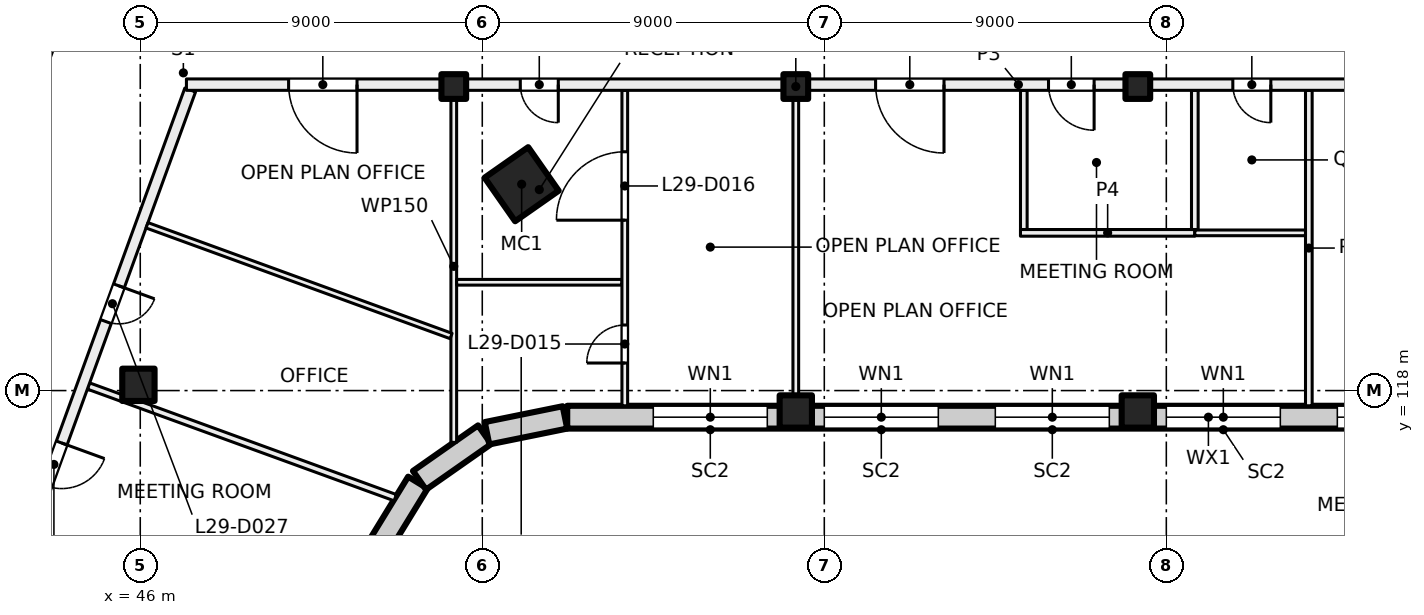
"""IFC4 building model, lengths in metres.
Left out: names, types, materials, properties, quantities, classifications, styles, units other than length and angle.
Written with IfcOpenShell. Run it as: python <this file> out.ifc"""

import sys

from ifc_helpers import new_model, si_unit, direction, frame, frame_2d, origin, origin_2d, place, context, subcontext, project, spatial, rectangle, hollow_rectangle, extrude, element, fill, save


model = new_model("IFC4")
c1 = context("Model", 3, precision=1e-05, world=origin(), true_north=direction((0.0, 1.0)))
c2 = subcontext(c1, "Body", "Model", "MODEL_VIEW")
j1 = project(units=[si_unit("LENGTHUNIT", "METRE"), si_unit("PLANEANGLEUNIT", "RADIAN")], contexts=[c1])
p1 = place(None, origin())
s1 = spatial("IfcSite", under=j1, at=p1, CompositionType="ELEMENT")
p2 = place(p1, origin())
s2 = spatial("IfcBuilding", under=s1, at=p2, CompositionType="ELEMENT")
p3 = place(p2, frame((0.0, 0.0, 125.0)))
s3 = spatial("IfcBuildingStorey", under=s2, at=p3, CompositionType="ELEMENT", Elevation=125.0)
p4 = place(p3, frame((56.036, 123.43, 0.0), z_axis=(0.0, 0.0, 1.0), x_axis=(0.573576436351, -0.819152044289, 0.0)))
e1 = element("IfcColumn", 1, at=p4, inside=s3, PredefinedType="COLUMN", context=c2, shape_type="SweptSolid", body=[
    extrude(hollow_rectangle(XDim=1.4, YDim=1.4, WallThickness=0.04, at=origin_2d()), origin(), (0.0, 0.0, 1.0), 4.0),
])
for number, where, z_axis, x_axis in (
    (2, (54.25, 126.0, 0.0), (0.0, 0.0, 1.0), (1.0, 0.0, 0.0)),
    (3, (63.25, 126.0, 0.0), (0.0, 0.0, 1.0), (1.0, 0.0, 0.0)),
    (4, (72.25, 126.0, 0.0), (0.0, 0.0, 1.0), (1.0, 0.0, 0.0)),
):
    element("IfcColumn", number, at=place(p3, frame(where, z_axis=z_axis, x_axis=x_axis)), inside=s3, PredefinedType="COLUMN", context=c2, shape_type="SweptSolid", body=[
        extrude(rectangle(XDim=0.65, YDim=0.65, at=origin_2d()), origin(), (0.0, 0.0, 1.0), 4.0),
    ])
for number, where, z_axis, x_axis in (
    (5, (45.952, 118.152, 0.0), (0.0, 0.0, 1.0), (1.0, 0.0, 0.0)),
    (6, (63.25, 117.45, 0.0), (0.0, 0.0, 1.0), (1.0, 0.0, 0.0)),
    (7, (72.25, 117.45, 0.0), (0.0, 0.0, 1.0), (1.0, 0.0, 0.0)),
):
    element("IfcColumn", number, at=place(p3, frame(where, z_axis=z_axis, x_axis=x_axis)), inside=s3, PredefinedType="COLUMN", context=c2, shape_type="SweptSolid", body=[
        extrude(rectangle(XDim=0.85, YDim=0.85, at=origin_2d()), origin(), (0.0, 0.0, 1.0), 4.0),
    ])
p5 = place(p3, frame((53.305, 115.578, 0.0), z_axis=(0.0, 0.0, 1.0), x_axis=(-0.522402266438, -0.852699168535, 0.0)))
e8 = element("IfcWall", 8, at=p5, inside=s3, PredefinedType="SOLIDWALL", context=c2, shape_type="SweptSolid", body=[
    extrude(rectangle(XDim=2.042, YDim=0.6, at=frame_2d((1.021, 0.0))), origin(), (0.0, 0.0, 1.0), 3.625),
])
for number, where, z_axis, x_axis in (
    (9, (55.062, 116.839, 0.0), (0.0, 0.0, 1.0), (-0.819, -0.574, 0.0)),
    (10, (57.175, 117.294, 0.0), (0.0, 0.0, 1.0), (-0.98, -0.199, 0.0)),
):
    element("IfcWall", number, at=place(p3, frame(where, z_axis=z_axis, x_axis=x_axis)), inside=s3, PredefinedType="SOLIDWALL", context=c2, shape_type="SweptSolid", body=[
        extrude(rectangle(XDim=2.092, YDim=0.6, at=frame_2d((1.046, 0.0))), origin(), (0.0, 0.0, 1.0), 3.625),
    ])
p6 = place(p3, frame((90.98, 117.3, 0.0), z_axis=(0.0, 0.0, 1.0), x_axis=(-1.0, 0.0, 0.0)))
e11 = element("IfcWall", 11, at=p6, inside=s3, PredefinedType="SOLIDWALL", context=c2, shape_type="SweptSolid", body=[
    extrude(rectangle(XDim=33.745, YDim=0.6, at=frame_2d((16.873, 0.0))), origin(), (0.0, 0.0, 1.0), 3.625),
])
p7 = place(p6, frame((1.48, 0.0, 0.9)))
e12 = element("IfcOpeningElement", 12, at=p7, cuts=e11, PredefinedType="OPENING", context=c2, shape_type="SweptSolid", body=[
    extrude(rectangle(XDim=3.0, YDim=2.4, at=frame_2d((1.5, 1.2))), frame((0.0, 0.31, 0.0), z_axis=(0.0, -1.0, 0.0), x_axis=(1.0, 0.0, 0.0)), (0.0, 0.0, 1.0), 0.62),
])
p8 = place(p6, frame((5.98, 0.0, 0.9)))
e13 = element("IfcOpeningElement", 13, at=p8, cuts=e11, PredefinedType="OPENING", context=c2, shape_type="SweptSolid", body=[
    extrude(rectangle(XDim=3.0, YDim=2.4, at=frame_2d((1.5, 1.2))), frame((0.0, 0.31, 0.0), z_axis=(0.0, -1.0, 0.0), x_axis=(1.0, 0.0, 0.0)), (0.0, 0.0, 1.0), 0.62),
])
p9 = place(p6, frame((10.48, 0.0, 0.9)))
e14 = element("IfcOpeningElement", 14, at=p9, cuts=e11, PredefinedType="OPENING", context=c2, shape_type="SweptSolid", body=[
    extrude(rectangle(XDim=3.0, YDim=2.4, at=frame_2d((1.5, 1.2))), frame((0.0, 0.31, 0.0), z_axis=(0.0, -1.0, 0.0), x_axis=(1.0, 0.0, 0.0)), (0.0, 0.0, 1.0), 0.62),
])
p10 = place(p6, frame((14.98, 0.0, 0.9)))
e15 = element("IfcOpeningElement", 15, at=p10, cuts=e11, PredefinedType="OPENING", context=c2, shape_type="SweptSolid", body=[
    extrude(rectangle(XDim=3.0, YDim=2.4, at=frame_2d((1.5, 1.2))), frame((0.0, 0.31, 0.0), z_axis=(0.0, -1.0, 0.0), x_axis=(1.0, 0.0, 0.0)), (0.0, 0.0, 1.0), 0.62),
])
p11 = place(p6, frame((19.48, 0.0, 0.9)))
e16 = element("IfcOpeningElement", 16, at=p11, cuts=e11, PredefinedType="OPENING", context=c2, shape_type="SweptSolid", body=[
    extrude(rectangle(XDim=3.0, YDim=2.4, at=frame_2d((1.5, 1.2))), frame((0.0, 0.31, 0.0), z_axis=(0.0, -1.0, 0.0), x_axis=(1.0, 0.0, 0.0)), (0.0, 0.0, 1.0), 0.62),
])
p12 = place(p6, frame((23.98, 0.0, 0.9)))
e17 = element("IfcOpeningElement", 17, at=p12, cuts=e11, PredefinedType="OPENING", context=c2, shape_type="SweptSolid", body=[
    extrude(rectangle(XDim=3.0, YDim=2.4, at=frame_2d((1.5, 1.2))), frame((0.0, 0.31, 0.0), z_axis=(0.0, -1.0, 0.0), x_axis=(1.0, 0.0, 0.0)), (0.0, 0.0, 1.0), 0.62),
])
p13 = place(p6, frame((28.48, 0.0, 0.9)))
e18 = element("IfcOpeningElement", 18, at=p13, cuts=e11, PredefinedType="OPENING", context=c2, shape_type="SweptSolid", body=[
    extrude(rectangle(XDim=3.0, YDim=2.4, at=frame_2d((1.5, 1.2))), frame((0.0, 0.31, 0.0), z_axis=(0.0, -1.0, 0.0), x_axis=(1.0, 0.0, 0.0)), (0.0, 0.0, 1.0), 0.62),
])
p14 = place(p3, frame((32.881, 97.657, 0.0), z_axis=(0.0, 0.0, 1.0), x_axis=(0.342017360004, 0.939693633828, 0.0)))
e19 = element("IfcWall", 19, at=p14, inside=s3, PredefinedType="PARTITIONING", context=c2, shape_type="SweptSolid", body=[
    extrude(rectangle(XDim=34.516, YDim=0.3, at=frame_2d((17.258, 0.0))), origin(), (0.0, 0.0, 1.0), 3.625),
])
p15 = place(p14, frame((4.275, 0.0, 0.0)))
e20 = element("IfcOpeningElement", 20, at=p15, cuts=e19, PredefinedType="OPENING", context=c2, shape_type="SweptSolid", body=[
    extrude(rectangle(XDim=1.2, YDim=2.1, at=frame_2d((0.6, 1.05))), frame((0.0, 0.16, 0.0), z_axis=(0.0, -1.0, 0.0), x_axis=(1.0, 0.0, 0.0)), (0.0, 0.0, 1.0), 0.32),
])
p16 = place(p14, frame((10.75, 0.0, 0.0)))
e21 = element("IfcOpeningElement", 21, at=p16, cuts=e19, PredefinedType="OPENING", context=c2, shape_type="SweptSolid", body=[
    extrude(rectangle(XDim=1.0, YDim=2.1, at=frame_2d((0.5, 1.05))), frame((0.0, 0.16, 0.0), z_axis=(0.0, -1.0, 0.0), x_axis=(1.0, 0.0, 0.0)), (0.0, 0.0, 1.0), 0.32),
])
p17 = place(p14, frame((15.25, 0.0, 0.0)))
e22 = element("IfcOpeningElement", 22, at=p17, cuts=e19, PredefinedType="OPENING", context=c2, shape_type="SweptSolid", body=[
    extrude(rectangle(XDim=1.0, YDim=2.1, at=frame_2d((0.5, 1.05))), frame((0.0, 0.16, 0.0), z_axis=(0.0, -1.0, 0.0), x_axis=(1.0, 0.0, 0.0)), (0.0, 0.0, 1.0), 0.32),
])
p18 = place(p14, frame((20.4, 0.0, 0.0)))
e23 = element("IfcOpeningElement", 23, at=p18, cuts=e19, PredefinedType="OPENING", context=c2, shape_type="SweptSolid", body=[
    extrude(rectangle(XDim=1.2, YDim=2.1, at=frame_2d((0.6, 1.05))), frame((0.0, 0.16, 0.0), z_axis=(0.0, -1.0, 0.0), x_axis=(1.0, 0.0, 0.0)), (0.0, 0.0, 1.0), 0.32),
])
p19 = place(p14, frame((25.0, 0.0, 0.0)))
e24 = element("IfcOpeningElement", 24, at=p19, cuts=e19, PredefinedType="OPENING", context=c2, shape_type="SweptSolid", body=[
    extrude(rectangle(XDim=1.0, YDim=2.1, at=frame_2d((0.5, 1.05))), frame((0.0, 0.16, 0.0), z_axis=(0.0, -1.0, 0.0), x_axis=(1.0, 0.0, 0.0)), (0.0, 0.0, 1.0), 0.32),
])
p20 = place(p3, frame((44.639, 118.12, 0.0), z_axis=(0.0, 0.0, 1.0), x_axis=(0.939669707102, -0.342083091593, 0.0)))
e25 = element("IfcWall", 25, at=p20, inside=s3, PredefinedType="PARTITIONING", context=c2, shape_type="SweptSolid", body=[
    extrude(rectangle(XDim=8.589, YDim=0.175, at=frame_2d((4.295, 0.0))), origin(), (0.0, 0.0, 1.0), 3.625),
])
p21 = place(p3, frame((47.314, 125.909, 0.0), z_axis=(0.0, 0.0, 1.0), x_axis=(-0.342010770371, -0.939696032209, 0.0)))
e26 = element("IfcWall", 26, at=p21, inside=s3, PredefinedType="PARTITIONING", context=c2, shape_type="SweptSolid", body=[
    extrude(rectangle(XDim=31.485, YDim=0.3, at=frame_2d((15.742, 0.0))), origin(), (0.0, 0.0, 1.0), 3.625),
])
p22 = place(p21, frame((22.21, 0.0, 0.0)))
e27 = element("IfcOpeningElement", 27, at=p22, cuts=e26, PredefinedType="OPENING", context=c2, shape_type="SweptSolid", body=[
    extrude(rectangle(XDim=1.8, YDim=2.1, at=frame_2d((0.9, 1.05))), frame((0.0, 0.16, 0.0), z_axis=(0.0, -1.0, 0.0), x_axis=(1.0, 0.0, 0.0)), (0.0, 0.0, 1.0), 0.32),
])
p23 = place(p21, frame((9.885, 0.0, 0.0)))
e28 = element("IfcOpeningElement", 28, at=p23, cuts=e26, PredefinedType="OPENING", context=c2, shape_type="SweptSolid", body=[
    extrude(rectangle(XDim=1.2, YDim=2.1, at=frame_2d((0.6, 1.05))), frame((0.0, 0.16, 0.0), z_axis=(0.0, -1.0, 0.0), x_axis=(1.0, 0.0, 0.0)), (0.0, 0.0, 1.0), 0.32),
])
p24 = place(p21, frame((5.484, 0.0, 0.0)))
e29 = element("IfcOpeningElement", 29, at=p24, cuts=e26, PredefinedType="OPENING", context=c2, shape_type="SweptSolid", body=[
    extrude(rectangle(XDim=1.0, YDim=2.1, at=frame_2d((0.5, 1.05))), frame((0.0, 0.16, 0.0), z_axis=(0.0, -1.0, 0.0), x_axis=(1.0, 0.0, 0.0)), (0.0, 0.0, 1.0), 0.32),
])
p25 = place(p3, frame((54.25, 116.637, 0.0), z_axis=(0.0, 0.0, 1.0), x_axis=(0.0, 1.0, 0.0)))
e30 = element("IfcWall", 30, at=p25, inside=s3, PredefinedType="PARTITIONING", context=c2, shape_type="SweptSolid", body=[
    extrude(rectangle(XDim=9.263, YDim=0.15, at=frame_2d((4.631, 0.0))), origin(), (0.0, 0.0, 1.0), 3.625),
])
p26 = place(p3, frame((54.18, 119.436, 0.0), z_axis=(0.0, 0.0, 1.0), x_axis=(-0.939669476286, 0.342083725624, 0.0)))
e31 = element("IfcWall", 31, at=p26, inside=s3, PredefinedType="PARTITIONING", context=c2, shape_type="SweptSolid", body=[
    extrude(rectangle(XDim=8.516, YDim=0.15, at=frame_2d((4.258, 0.0))), origin(), (0.0, 0.0, 1.0), 3.625),
])
p27 = place(p3, frame((54.325, 120.85, 0.0), z_axis=(0.0, 0.0, 1.0), x_axis=(1.0, 0.0, 0.0)))
e32 = element("IfcWall", 32, at=p27, inside=s3, PredefinedType="PARTITIONING", context=c2, shape_type="SweptSolid", body=[
    extrude(rectangle(XDim=4.35, YDim=0.15, at=frame_2d((2.175, 0.0))), origin(), (0.0, 0.0, 1.0), 3.625),
])
p28 = place(p3, frame((58.75, 117.6, 0.0), z_axis=(0.0, 0.0, 1.0), x_axis=(0.0, 1.0, 0.0)))
e33 = element("IfcWall", 33, at=p28, inside=s3, PredefinedType="PARTITIONING", context=c2, shape_type="SweptSolid", body=[
    extrude(rectangle(XDim=8.3, YDim=0.15, at=frame_2d((4.15, 0.0))), origin(), (0.0, 0.0, 1.0), 3.625),
])
p29 = place(p28, frame((1.125, 0.0, 0.0)))
e34 = element("IfcOpeningElement", 34, at=p29, cuts=e33, PredefinedType="OPENING", context=c2, shape_type="SweptSolid", body=[
    extrude(rectangle(XDim=1.0, YDim=2.1, at=frame_2d((0.5, 1.05))), frame((0.0, 0.085, 0.0), z_axis=(0.0, -1.0, 0.0), x_axis=(1.0, 0.0, 0.0)), (0.0, 0.0, 1.0), 0.17),
])
p30 = place(p28, frame((4.884, 0.0, 0.0)))
e35 = element("IfcOpeningElement", 35, at=p30, cuts=e33, PredefinedType="OPENING", context=c2, shape_type="SweptSolid", body=[
    extrude(rectangle(XDim=1.8, YDim=2.1, at=frame_2d((0.9, 1.05))), frame((0.0, 0.085, 0.0), z_axis=(0.0, -1.0, 0.0), x_axis=(1.0, 0.0, 0.0)), (0.0, 0.0, 1.0), 0.17),
])
p31 = place(p3, frame((63.25, 117.6, 0.0), z_axis=(0.0, 0.0, 1.0), x_axis=(0.0, 1.0, 0.0)))
e36 = element("IfcWall", 36, at=p31, inside=s3, PredefinedType="PARTITIONING", context=c2, shape_type="SweptSolid", body=[
    extrude(rectangle(XDim=8.3, YDim=0.15, at=frame_2d((4.15, 0.0))), origin(), (0.0, 0.0, 1.0), 3.625),
])
p32 = place(p3, frame((69.25, 122.238, 0.0), z_axis=(0.0, 0.0, 1.0), x_axis=(0.0, 1.0, 0.0)))
e37 = element("IfcWall", 37, at=p32, inside=s3, PredefinedType="PARTITIONING", context=c2, shape_type="SweptSolid", body=[
    extrude(rectangle(XDim=3.662, YDim=0.175, at=frame_2d((1.831, 0.0))), origin(), (0.0, 0.0, 1.0), 3.625),
])
p33 = place(p3, frame((73.75, 122.15, 0.0), z_axis=(0.0, 0.0, 1.0), x_axis=(-1.0, 0.0, 0.0)))
e38 = element("IfcWall", 38, at=p33, inside=s3, PredefinedType="PARTITIONING", context=c2, shape_type="SweptSolid", body=[
    extrude(rectangle(XDim=4.588, YDim=0.175, at=frame_2d((2.294, 0.0))), origin(), (0.0, 0.0, 1.0), 3.625),
])
p34 = place(p3, frame((73.75, 125.9, 0.0), z_axis=(0.0, 0.0, 1.0), x_axis=(0.0, -1.0, 0.0)))
e39 = element("IfcWall", 39, at=p34, inside=s3, PredefinedType="PARTITIONING", context=c2, shape_type="SweptSolid", body=[
    extrude(rectangle(XDim=3.662, YDim=0.175, at=frame_2d((1.831, 0.0))), origin(), (0.0, 0.0, 1.0), 3.625),
])
p35 = place(p3, frame((76.75, 117.6, 0.0), z_axis=(0.0, 0.0, 1.0), x_axis=(0.0, 1.0, 0.0)))
e40 = element("IfcWall", 40, at=p35, inside=s3, PredefinedType="PARTITIONING", context=c2, shape_type="SweptSolid", body=[
    extrude(rectangle(XDim=8.3, YDim=0.175, at=frame_2d((4.15, 0.0))), origin(), (0.0, 0.0, 1.0), 3.625),
])
p36 = place(p3, frame((76.662, 122.15, 0.0), z_axis=(0.0, 0.0, 1.0), x_axis=(-1.0, 0.0, 0.0)))
e41 = element("IfcWall", 41, at=p36, inside=s3, PredefinedType="PARTITIONING", context=c2, shape_type="SweptSolid", body=[
    extrude(rectangle(XDim=2.912, YDim=0.15, at=frame_2d((1.456, 0.0))), origin(), (0.0, 0.0, 1.0), 3.625),
])
p37 = place(p3, frame((91.0, 126.05, 0.0), z_axis=(0.0, 0.0, 1.0), x_axis=(-1.0, 0.0, 0.0)))
e42 = element("IfcWall", 42, at=p37, inside=s3, PredefinedType="PARTITIONING", context=c2, shape_type="SweptSolid", body=[
    extrude(rectangle(XDim=43.785, YDim=0.3, at=frame_2d((21.893, 0.0))), origin(), (0.0, 0.0, 1.0), 3.625),
])
p38 = place(p37, frame((2.025, 0.0, 0.0)))
e43 = element("IfcOpeningElement", 43, at=p38, cuts=e42, PredefinedType="OPENING", context=c2, shape_type="SweptSolid", body=[
    extrude(rectangle(XDim=1.2, YDim=2.1, at=frame_2d((0.6, 1.05))), frame((0.0, 0.16, 0.0), z_axis=(0.0, -1.0, 0.0), x_axis=(1.0, 0.0, 0.0)), (0.0, 0.0, 1.0), 0.32),
])
p39 = place(p37, frame((6.9, 0.0, 0.0)))
e44 = element("IfcOpeningElement", 44, at=p39, cuts=e42, PredefinedType="OPENING", context=c2, shape_type="SweptSolid", body=[
    extrude(rectangle(XDim=1.2, YDim=2.1, at=frame_2d((0.6, 1.05))), frame((0.0, 0.16, 0.0), z_axis=(0.0, -1.0, 0.0), x_axis=(1.0, 0.0, 0.0)), (0.0, 0.0, 1.0), 0.32),
])
p40 = place(p37, frame((11.4, 0.0, 0.0)))
e45 = element("IfcOpeningElement", 45, at=p40, cuts=e42, PredefinedType="OPENING", context=c2, shape_type="SweptSolid", body=[
    extrude(rectangle(XDim=1.2, YDim=2.1, at=frame_2d((0.6, 1.05))), frame((0.0, 0.16, 0.0), z_axis=(0.0, -1.0, 0.0), x_axis=(1.0, 0.0, 0.0)), (0.0, 0.0, 1.0), 0.32),
])
p41 = place(p37, frame((15.25, 0.0, 0.0)))
e46 = element("IfcOpeningElement", 46, at=p41, cuts=e42, PredefinedType="OPENING", context=c2, shape_type="SweptSolid", body=[
    extrude(rectangle(XDim=1.0, YDim=2.1, at=frame_2d((0.5, 1.05))), frame((0.0, 0.16, 0.0), z_axis=(0.0, -1.0, 0.0), x_axis=(1.0, 0.0, 0.0)), (0.0, 0.0, 1.0), 0.32),
])
p42 = place(p37, frame((19.9, 0.0, 0.0)))
e47 = element("IfcOpeningElement", 47, at=p42, cuts=e42, PredefinedType="OPENING", context=c2, shape_type="SweptSolid", body=[
    extrude(rectangle(XDim=1.2, YDim=2.1, at=frame_2d((0.6, 1.05))), frame((0.0, 0.16, 0.0), z_axis=(0.0, -1.0, 0.0), x_axis=(1.0, 0.0, 0.0)), (0.0, 0.0, 1.0), 0.32),
])
p43 = place(p37, frame((23.85, 0.0, 0.0)))
e48 = element("IfcOpeningElement", 48, at=p43, cuts=e42, PredefinedType="OPENING", context=c2, shape_type="SweptSolid", body=[
    extrude(rectangle(XDim=1.8, YDim=2.1, at=frame_2d((0.9, 1.05))), frame((0.0, 0.16, 0.0), z_axis=(0.0, -1.0, 0.0), x_axis=(1.0, 0.0, 0.0)), (0.0, 0.0, 1.0), 0.32),
])
p44 = place(p37, frame((34.0, 0.0, 0.0)))
e49 = element("IfcOpeningElement", 49, at=p44, cuts=e42, PredefinedType="OPENING", context=c2, shape_type="SweptSolid", body=[
    extrude(rectangle(XDim=1.0, YDim=2.1, at=frame_2d((0.5, 1.05))), frame((0.0, 0.16, 0.0), z_axis=(0.0, -1.0, 0.0), x_axis=(1.0, 0.0, 0.0)), (0.0, 0.0, 1.0), 0.32),
])
p45 = place(p37, frame((39.296, 0.0, 0.0)))
e50 = element("IfcOpeningElement", 50, at=p45, cuts=e42, PredefinedType="OPENING", context=c2, shape_type="SweptSolid", body=[
    extrude(rectangle(XDim=1.8, YDim=2.1, at=frame_2d((0.9, 1.05))), frame((0.0, 0.16, 0.0), z_axis=(0.0, -1.0, 0.0), x_axis=(1.0, 0.0, 0.0)), (0.0, 0.0, 1.0), 0.32),
])
p46 = place(p9, origin())
e51 = element("IfcWindow", 51, at=p46, inside=s3, PartitioningType="SINGLE_PANEL", PredefinedType="WINDOW", context=c2, shape_type="SweptSolid", body=[
    extrude(rectangle(XDim=3.0, YDim=2.4, at=frame_2d((1.5, 1.2))), frame((0.0, 0.03, 0.0), z_axis=(0.0, -1.0, 0.0), x_axis=(1.0, 0.0, 0.0)), (0.0, 0.0, 1.0), 0.06),
])
fill(e14, e51)
p47 = place(p10, origin())
e52 = element("IfcWindow", 52, at=p47, inside=s3, PartitioningType="SINGLE_PANEL", PredefinedType="WINDOW", context=c2, shape_type="SweptSolid", body=[
    extrude(rectangle(XDim=3.0, YDim=2.4, at=frame_2d((1.5, 1.2))), frame((0.0, 0.03, 0.0), z_axis=(0.0, -1.0, 0.0), x_axis=(1.0, 0.0, 0.0)), (0.0, 0.0, 1.0), 0.06),
])
fill(e15, e52)
p48 = place(p11, origin())
e53 = element("IfcWindow", 53, at=p48, inside=s3, PartitioningType="SINGLE_PANEL", PredefinedType="WINDOW", context=c2, shape_type="SweptSolid", body=[
    extrude(rectangle(XDim=3.0, YDim=2.4, at=frame_2d((1.5, 1.2))), frame((0.0, 0.03, 0.0), z_axis=(0.0, -1.0, 0.0), x_axis=(1.0, 0.0, 0.0)), (0.0, 0.0, 1.0), 0.06),
])
fill(e16, e53)
p49 = place(p12, origin())
e54 = element("IfcWindow", 54, at=p49, inside=s3, PartitioningType="SINGLE_PANEL", PredefinedType="WINDOW", context=c2, shape_type="SweptSolid", body=[
    extrude(rectangle(XDim=3.0, YDim=2.4, at=frame_2d((1.5, 1.2))), frame((0.0, 0.03, 0.0), z_axis=(0.0, -1.0, 0.0), x_axis=(1.0, 0.0, 0.0)), (0.0, 0.0, 1.0), 0.06),
])
fill(e17, e54)
p50 = place(p13, origin())
e55 = element("IfcWindow", 55, at=p50, inside=s3, PartitioningType="SINGLE_PANEL", PredefinedType="WINDOW", context=c2, shape_type="SweptSolid", body=[
    extrude(rectangle(XDim=3.0, YDim=2.4, at=frame_2d((1.5, 1.2))), frame((0.0, 0.03, 0.0), z_axis=(0.0, -1.0, 0.0), x_axis=(1.0, 0.0, 0.0)), (0.0, 0.0, 1.0), 0.06),
])
fill(e18, e55)
p51 = place(p41, origin())
e56 = element("IfcDoor", 56, at=p51, inside=s3, OperationType="SINGLE_SWING_LEFT", PredefinedType="DOOR", context=c2, shape_type="SweptSolid", body=[
    extrude(rectangle(XDim=1.0, YDim=2.1, at=frame_2d((0.5, 1.05))), frame((0.0, 0.025, 0.0), z_axis=(0.0, -1.0, 0.0), x_axis=(1.0, 0.0, 0.0)), (0.0, 0.0, 1.0), 0.05),
])
fill(e46, e56)
p52 = place(p42, origin())
e57 = element("IfcDoor", 57, at=p52, inside=s3, OperationType="DOUBLE_DOOR_SINGLE_SWING", PredefinedType="DOOR", context=c2, shape_type="SweptSolid", body=[
    extrude(rectangle(XDim=1.2, YDim=2.1, at=frame_2d((0.6, 1.05))), frame((0.0, 0.025, 0.0), z_axis=(0.0, -1.0, 0.0), x_axis=(1.0, 0.0, 0.0)), (0.0, 0.0, 1.0), 0.05),
])
fill(e47, e57)
p53 = place(p43, origin())
e58 = element("IfcDoor", 58, at=p53, inside=s3, OperationType="DOUBLE_DOOR_SINGLE_SWING", PredefinedType="DOOR", context=c2, shape_type="SweptSolid", body=[
    extrude(rectangle(XDim=1.8, YDim=2.1, at=frame_2d((0.9, 1.05))), frame((0.0, 0.025, 0.0), z_axis=(0.0, -1.0, 0.0), x_axis=(1.0, 0.0, 0.0)), (0.0, 0.0, 1.0), 0.05),
])
fill(e48, e58)
p54 = place(p44, origin())
e59 = element("IfcDoor", 59, at=p54, inside=s3, OperationType="SINGLE_SWING_LEFT", PredefinedType="DOOR", context=c2, shape_type="SweptSolid", body=[
    extrude(rectangle(XDim=1.0, YDim=2.1, at=frame_2d((0.5, 1.05))), frame((0.0, 0.025, 0.0), z_axis=(0.0, -1.0, 0.0), x_axis=(1.0, 0.0, 0.0)), (0.0, 0.0, 1.0), 0.05),
])
fill(e49, e59)
p55 = place(p29, origin())
e60 = element("IfcDoor", 60, at=p55, inside=s3, OperationType="SINGLE_SWING_RIGHT", PredefinedType="DOOR", context=c2, shape_type="SweptSolid", body=[
    extrude(rectangle(XDim=1.0, YDim=2.1, at=frame_2d((0.5, 1.05))), frame((0.0, 0.025, 0.0), z_axis=(0.0, -1.0, 0.0), x_axis=(1.0, 0.0, 0.0)), (0.0, 0.0, 1.0), 0.05),
])
fill(e34, e60)
p56 = place(p30, origin())
e61 = element("IfcDoor", 61, at=p56, inside=s3, OperationType="DOUBLE_DOOR_SINGLE_SWING", PredefinedType="DOOR", context=c2, shape_type="SweptSolid", body=[
    extrude(rectangle(XDim=1.8, YDim=2.1, at=frame_2d((0.9, 1.05))), frame((0.0, 0.025, 0.0), z_axis=(0.0, -1.0, 0.0), x_axis=(1.0, 0.0, 0.0)), (0.0, 0.0, 1.0), 0.05),
])
fill(e35, e61)
p57 = place(p23, origin())
e62 = element("IfcDoor", 62, at=p57, inside=s3, OperationType="DOUBLE_DOOR_SINGLE_SWING", PredefinedType="DOOR", context=c2, shape_type="SweptSolid", body=[
    extrude(rectangle(XDim=1.2, YDim=2.1, at=frame_2d((0.6, 1.05))), frame((0.0, 0.025, 0.0), z_axis=(0.0, -1.0, 0.0), x_axis=(1.0, 0.0, 0.0)), (0.0, 0.0, 1.0), 0.05),
])
fill(e28, e62)
p58 = place(p24, origin())
e63 = element("IfcDoor", 63, at=p58, inside=s3, OperationType="SINGLE_SWING_LEFT", PredefinedType="DOOR", context=c2, shape_type="SweptSolid", body=[
    extrude(rectangle(XDim=1.0, YDim=2.1, at=frame_2d((0.5, 1.05))), frame((0.0, 0.025, 0.0), z_axis=(0.0, -1.0, 0.0), x_axis=(1.0, 0.0, 0.0)), (0.0, 0.0, 1.0), 0.05),
])
fill(e29, e63)
p59 = place(p45, origin())
e64 = element("IfcDoor", 64, at=p59, inside=s3, OperationType="DOUBLE_DOOR_SINGLE_SWING", PredefinedType="DOOR", context=c2, shape_type="SweptSolid", body=[
    extrude(rectangle(XDim=1.8, YDim=2.1, at=frame_2d((0.9, 1.05))), frame((0.0, 0.025, 0.0), z_axis=(0.0, -1.0, 0.0), x_axis=(1.0, 0.0, 0.0)), (0.0, 0.0, 1.0), 0.05),
])
fill(e50, e64)
save(model, sys.argv[1])
